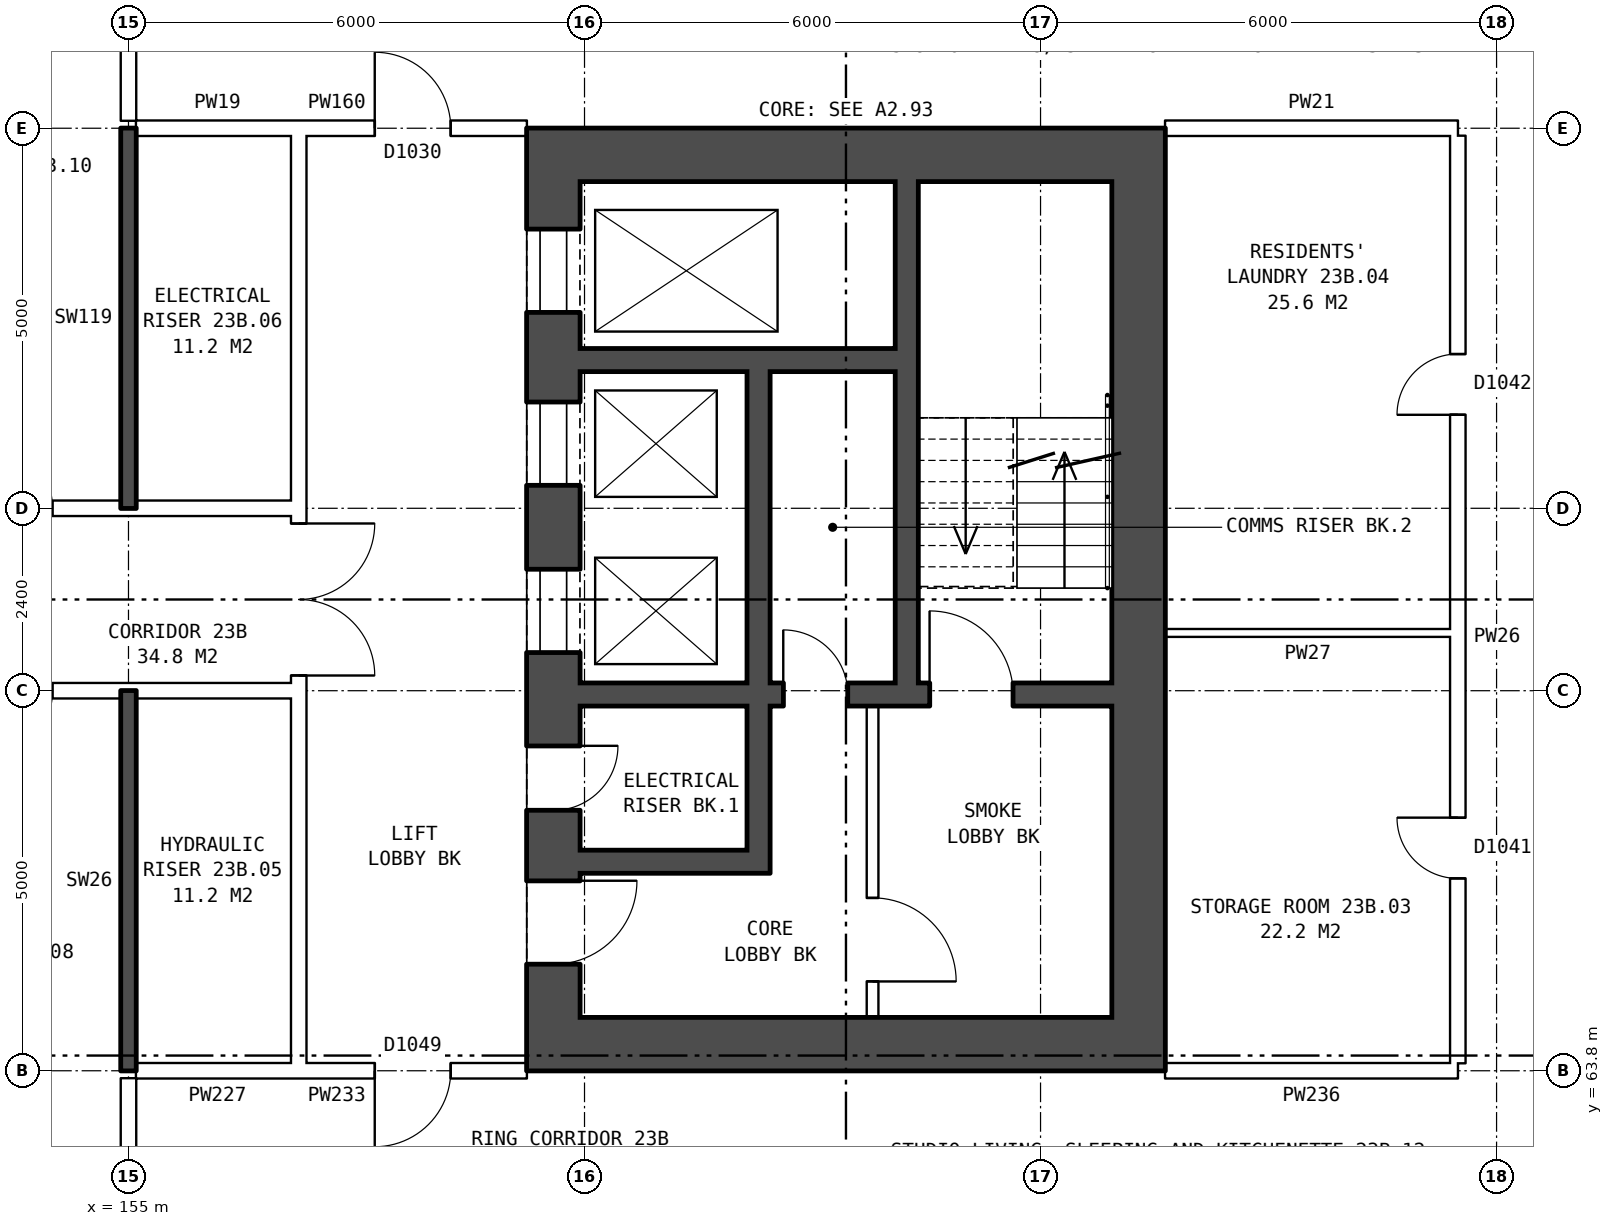
"""IFC4 building model, lengths in metres.
Left out: names, types, materials, properties, quantities, classifications, styles, units other than length and angle.
Written with IfcOpenShell. Run it as: python <this file> out.ifc"""

import sys

from ifc_helpers import new_model, si_unit, direction, frame, frame_2d, origin, place, context, subcontext, project, spatial, rectangle, extrude, element, fill, save


model = new_model("IFC4")
c1 = context("Model", 3, precision=1e-05, world=origin(), true_north=direction((0.0, 1.0)))
c2 = subcontext(c1, "Body", "Model", "MODEL_VIEW")
j1 = project(units=[si_unit("LENGTHUNIT", "METRE"), si_unit("PLANEANGLEUNIT", "RADIAN")], contexts=[c1])
p1 = place(None, origin())
s1 = spatial("IfcSite", under=j1, at=p1, CompositionType="ELEMENT")
p2 = place(p1, origin())
s2 = spatial("IfcBuilding", under=s1, at=p2, CompositionType="ELEMENT")
p3 = place(p2, frame((0.0, 0.0, 84.0)))
s3 = spatial("IfcBuildingStorey", under=s2, at=p3, CompositionType="ELEMENT", Elevation=84.0)
p4 = place(p3, frame((160.59, 75.5, 0.0), z_axis=(0.0, 0.0, 1.0), x_axis=(0.0, -1.0, 0.0)))
e1 = element("IfcWall", 1, at=p4, inside=s3, PredefinedType="SHEAR", context=c2, shape_type="SweptSolid", body=[
    extrude(rectangle(XDim=11.0, YDim=0.7, at=frame_2d((5.5, 0.0))), origin(), (0.0, 0.0, 1.0), 2.85),
])
p5 = place(p4, frame((0.625, 0.0, 0.0)))
e2 = element("IfcOpeningElement", 2, at=p5, cuts=e1, PredefinedType="OPENING", context=c2, shape_type="SweptSolid", body=[
    extrude(rectangle(XDim=1.1, YDim=2.1, at=frame_2d((0.55, 1.05))), frame((0.0, 0.36, 0.0), z_axis=(0.0, -1.0, 0.0), x_axis=(1.0, 0.0, 0.0)), (0.0, 0.0, 1.0), 0.72),
])
p6 = place(p4, frame((2.9, 0.0, 0.0)))
e3 = element("IfcOpeningElement", 3, at=p6, cuts=e1, PredefinedType="OPENING", context=c2, shape_type="SweptSolid", body=[
    extrude(rectangle(XDim=1.1, YDim=2.1, at=frame_2d((0.55, 1.05))), frame((0.0, 0.36, 0.0), z_axis=(0.0, -1.0, 0.0), x_axis=(1.0, 0.0, 0.0)), (0.0, 0.0, 1.0), 0.72),
])
p7 = place(p4, frame((5.1, 0.0, 0.0)))
e4 = element("IfcOpeningElement", 4, at=p7, cuts=e1, PredefinedType="OPENING", context=c2, shape_type="SweptSolid", body=[
    extrude(rectangle(XDim=1.1, YDim=2.1, at=frame_2d((0.55, 1.05))), frame((0.0, 0.36, 0.0), z_axis=(0.0, -1.0, 0.0), x_axis=(1.0, 0.0, 0.0)), (0.0, 0.0, 1.0), 0.72),
])
p8 = place(p4, frame((9.2, 0.0, 0.0)))
e5 = element("IfcOpeningElement", 5, at=p8, cuts=e1, PredefinedType="OPENING", context=c2, shape_type="SweptSolid", body=[
    extrude(rectangle(XDim=1.1, YDim=2.1, at=frame_2d((0.55, 1.05))), frame((0.0, 0.36, 0.0), z_axis=(0.0, -1.0, 0.0), x_axis=(1.0, 0.0, 0.0)), (0.0, 0.0, 1.0), 0.72),
])
p9 = place(p4, frame((7.425, 0.0, 0.0)))
e6 = element("IfcOpeningElement", 6, at=p9, cuts=e1, PredefinedType="OPENING", context=c2, shape_type="SweptSolid", body=[
    extrude(rectangle(XDim=0.85, YDim=2.1, at=frame_2d((0.425, 1.05))), frame((0.0, 0.36, 0.0), z_axis=(0.0, -1.0, 0.0), x_axis=(1.0, 0.0, 0.0)), (0.0, 0.0, 1.0), 0.72),
])
p10 = place(p3, frame((168.29, 75.5, 0.0), z_axis=(0.0, 0.0, 1.0), x_axis=(0.0, -1.0, 0.0)))
e7 = element("IfcWall", 7, at=p10, inside=s3, PredefinedType="SHEAR", context=c2, shape_type="SweptSolid", body=[
    extrude(rectangle(XDim=11.0, YDim=0.7, at=frame_2d((5.5, 0.0))), origin(), (0.0, 0.0, 1.0), 2.85),
])
for number, where, z_axis, x_axis in (
    (8, (160.24, 75.85, 0.0), (0.0, 0.0, 1.0), (1.0, 0.0, 0.0)),
    (9, (160.24, 64.15, 0.0), (0.0, 0.0, 1.0), (1.0, 0.0, 0.0)),
):
    element("IfcWall", number, at=place(p3, frame(where, z_axis=z_axis, x_axis=x_axis)), inside=s3, PredefinedType="SHEAR", context=c2, shape_type="SweptSolid", body=[
        extrude(rectangle(XDim=8.4, YDim=0.7, at=frame_2d((4.2, 0.0))), origin(), (0.0, 0.0, 1.0), 2.85),
    ])
p11 = place(p3, frame((160.94, 73.15, 0.0), z_axis=(0.0, 0.0, 1.0), x_axis=(1.0, 0.0, 0.0)))
e10 = element("IfcWall", 10, at=p11, inside=s3, PredefinedType="SHEAR", context=c2, shape_type="SweptSolid", body=[
    extrude(rectangle(XDim=4.15, YDim=0.3, at=frame_2d((2.075, 0.0))), origin(), (0.0, 0.0, 1.0), 2.85),
])
p12 = place(p3, frame((160.94, 68.75, 0.0), z_axis=(0.0, 0.0, 1.0), x_axis=(1.0, 0.0, 0.0)))
e11 = element("IfcWall", 11, at=p12, inside=s3, PredefinedType="SHEAR", context=c2, shape_type="SweptSolid", body=[
    extrude(rectangle(XDim=7.0, YDim=0.3, at=frame_2d((3.5, 0.0))), origin(), (0.0, 0.0, 1.0), 2.85),
])
p13 = place(p12, frame((4.6, 0.0, 0.0)))
e12 = element("IfcOpeningElement", 12, at=p13, cuts=e11, PredefinedType="OPENING", context=c2, shape_type="SweptSolid", body=[
    extrude(rectangle(XDim=1.1, YDim=2.1, at=frame_2d((0.55, 1.05))), frame((0.0, 0.16, 0.0), z_axis=(0.0, -1.0, 0.0), x_axis=(1.0, 0.0, 0.0)), (0.0, 0.0, 1.0), 0.32),
])
p14 = place(p12, frame((2.675, 0.0, 0.0)))
e13 = element("IfcOpeningElement", 13, at=p14, cuts=e11, PredefinedType="OPENING", context=c2, shape_type="SweptSolid", body=[
    extrude(rectangle(XDim=0.85, YDim=2.1, at=frame_2d((0.425, 1.05))), frame((0.0, 0.16, 0.0), z_axis=(0.0, -1.0, 0.0), x_axis=(1.0, 0.0, 0.0)), (0.0, 0.0, 1.0), 0.32),
])
p15 = place(p3, frame((160.94, 66.55, 0.0), z_axis=(0.0, 0.0, 1.0), x_axis=(1.0, 0.0, 0.0)))
e14 = element("IfcWall", 14, at=p15, inside=s3, PredefinedType="SHEAR", context=c2, shape_type="SweptSolid", body=[
    extrude(rectangle(XDim=2.2, YDim=0.3, at=frame_2d((1.1, 0.0))), origin(), (0.0, 0.0, 1.0), 2.85),
])
p16 = place(p3, frame((163.29, 73.0, 0.0), z_axis=(0.0, 0.0, 1.0), x_axis=(0.0, -1.0, 0.0)))
e15 = element("IfcWall", 15, at=p16, inside=s3, PredefinedType="SHEAR", context=c2, shape_type="SweptSolid", body=[
    extrude(rectangle(XDim=4.1, YDim=0.3, at=frame_2d((2.05, 0.0))), origin(), (0.0, 0.0, 1.0), 2.85),
])
p17 = place(p3, frame((163.29, 68.6, 0.0), z_axis=(0.0, 0.0, 1.0), x_axis=(0.0, -1.0, 0.0)))
e16 = element("IfcWall", 16, at=p17, inside=s3, PredefinedType="SHEAR", context=c2, shape_type="SweptSolid", body=[
    extrude(rectangle(XDim=2.2, YDim=0.3, at=frame_2d((1.1, 0.0))), origin(), (0.0, 0.0, 1.0), 2.85),
])
p18 = place(p3, frame((164.79, 68.6, 0.0), z_axis=(0.0, 0.0, 1.0), x_axis=(0.0, -1.0, 0.0)))
e17 = element("IfcWall", 17, at=p18, inside=s3, PredefinedType="PARTITIONING", context=c2, shape_type="SweptSolid", body=[
    extrude(rectangle(XDim=4.1, YDim=0.15, at=frame_2d((2.05, 0.0))), origin(), (0.0, 0.0, 1.0), 2.85),
])
p19 = place(p18, frame((2.525, 0.0, 0.0)))
e18 = element("IfcOpeningElement", 18, at=p19, cuts=e17, PredefinedType="OPENING", context=c2, shape_type="SweptSolid", body=[
    extrude(rectangle(XDim=1.1, YDim=2.1, at=frame_2d((0.55, 1.05))), frame((0.0, 0.085, 0.0), z_axis=(0.0, -1.0, 0.0), x_axis=(1.0, 0.0, 0.0)), (0.0, 0.0, 1.0), 0.17),
])
p20 = place(p3, frame((165.24, 75.5, 0.0), z_axis=(0.0, 0.0, 1.0), x_axis=(0.0, -1.0, 0.0)))
e19 = element("IfcWall", 19, at=p20, inside=s3, PredefinedType="SHEAR", context=c2, shape_type="SweptSolid", body=[
    extrude(rectangle(XDim=6.6, YDim=0.3, at=frame_2d((3.3, 0.0))), origin(), (0.0, 0.0, 1.0), 2.85),
])
p21 = place(p3, frame((157.24, 63.9, 0.0), z_axis=(0.0, 0.0, 1.0), x_axis=(0.0, 1.0, 0.0)))
e20 = element("IfcWall", 20, at=p21, inside=s3, PredefinedType="PARTITIONING", context=c2, shape_type="SweptSolid", body=[
    extrude(rectangle(XDim=12.2, YDim=0.2, at=frame_2d((6.1, 0.0))), origin(), (0.0, 0.0, 1.0), 2.85),
])
p22 = place(p21, frame((5.1, 0.0, 0.0)))
e21 = element("IfcOpeningElement", 21, at=p22, cuts=e20, PredefinedType="OPENING", context=c2, shape_type="SweptSolid", body=[
    extrude(rectangle(XDim=2.0, YDim=2.1, at=frame_2d((1.0, 1.05))), frame((0.0, 0.11, 0.0), z_axis=(0.0, -1.0, 0.0), x_axis=(1.0, 0.0, 0.0)), (0.0, 0.0, 1.0), 0.22),
])
p23 = place(p3, frame((155.1, 63.8, 0.0), z_axis=(0.0, 0.0, 1.0), x_axis=(1.0, 0.0, 0.0)))
e22 = element("IfcWall", 22, at=p23, inside=s3, PredefinedType="PARTITIONING", context=c2, shape_type="SweptSolid", body=[
    extrude(rectangle(XDim=2.14, YDim=0.2, at=frame_2d((1.07, 0.0))), origin(), (0.0, 0.0, 1.0), 2.85),
])
p24 = place(p3, frame((157.24, 63.8, 0.0), z_axis=(0.0, 0.0, 1.0), x_axis=(1.0, 0.0, 0.0)))
e23 = element("IfcWall", 23, at=p24, inside=s3, PredefinedType="PARTITIONING", context=c2, shape_type="SweptSolid", body=[
    extrude(rectangle(XDim=3.0, YDim=0.2, at=frame_2d((1.5, 0.0))), origin(), (0.0, 0.0, 1.0), 2.85),
])
p25 = place(p24, frame((1.0, 0.0, 0.0)))
e24 = element("IfcOpeningElement", 24, at=p25, cuts=e23, PredefinedType="OPENING", context=c2, shape_type="SweptSolid", body=[
    extrude(rectangle(XDim=1.0, YDim=2.1, at=frame_2d((0.5, 1.05))), frame((0.0, 0.11, 0.0), z_axis=(0.0, -1.0, 0.0), x_axis=(1.0, 0.0, 0.0)), (0.0, 0.0, 1.0), 0.22),
])
p26 = place(p3, frame((168.64, 63.8, 0.0), z_axis=(0.0, 0.0, 1.0), x_axis=(1.0, 0.0, 0.0)))
e25 = element("IfcWall", 25, at=p26, inside=s3, PredefinedType="PARTITIONING", context=c2, shape_type="SweptSolid", body=[
    extrude(rectangle(XDim=3.85, YDim=0.2, at=frame_2d((1.925, 0.0))), origin(), (0.0, 0.0, 1.0), 2.85),
])
p27 = place(p3, frame((142.76, 68.8, 0.0), z_axis=(0.0, 0.0, 1.0), x_axis=(1.0, 0.0, 0.0)))
e26 = element("IfcWall", 26, at=p27, inside=s3, PredefinedType="PARTITIONING", context=c2, shape_type="SweptSolid", body=[
    extrude(rectangle(XDim=14.48, YDim=0.2, at=frame_2d((7.24, 0.0))), origin(), (0.0, 0.0, 1.0), 2.85),
])
p28 = place(p27, frame((4.24, 0.0, 0.0)))
e27 = element("IfcOpeningElement", 27, at=p28, cuts=e26, PredefinedType="OPENING", context=c2, shape_type="SweptSolid", body=[
    extrude(rectangle(XDim=1.0, YDim=2.1, at=frame_2d((0.5, 1.05))), frame((0.0, 0.11, 0.0), z_axis=(0.0, -1.0, 0.0), x_axis=(1.0, 0.0, 0.0)), (0.0, 0.0, 1.0), 0.22),
])
p29 = place(p27, frame((10.24, 0.0, 0.0)))
e28 = element("IfcOpeningElement", 28, at=p29, cuts=e26, PredefinedType="OPENING", context=c2, shape_type="SweptSolid", body=[
    extrude(rectangle(XDim=1.0, YDim=2.1, at=frame_2d((0.5, 1.05))), frame((0.0, 0.11, 0.0), z_axis=(0.0, -1.0, 0.0), x_axis=(1.0, 0.0, 0.0)), (0.0, 0.0, 1.0), 0.22),
])
p30 = place(p3, frame((168.64, 69.56, 0.0), z_axis=(0.0, 0.0, 1.0), x_axis=(1.0, 0.0, 0.0)))
e29 = element("IfcWall", 29, at=p30, inside=s3, PredefinedType="PARTITIONING", context=c2, shape_type="SweptSolid", body=[
    extrude(rectangle(XDim=3.75, YDim=0.1, at=frame_2d((1.875, 0.0))), origin(), (0.0, 0.0, 1.0), 2.85),
])
p31 = place(p3, frame((142.76, 71.2, 0.0), z_axis=(0.0, 0.0, 1.0), x_axis=(1.0, 0.0, 0.0)))
e30 = element("IfcWall", 30, at=p31, inside=s3, PredefinedType="PARTITIONING", context=c2, shape_type="SweptSolid", body=[
    extrude(rectangle(XDim=14.48, YDim=0.2, at=frame_2d((7.24, 0.0))), origin(), (0.0, 0.0, 1.0), 2.85),
])
p32 = place(p31, frame((1.12, 0.0, 0.0)))
e31 = element("IfcOpeningElement", 31, at=p32, cuts=e30, PredefinedType="OPENING", context=c2, shape_type="SweptSolid", body=[
    extrude(rectangle(XDim=1.0, YDim=2.1, at=frame_2d((0.5, 1.05))), frame((0.0, 0.11, 0.0), z_axis=(0.0, -1.0, 0.0), x_axis=(1.0, 0.0, 0.0)), (0.0, 0.0, 1.0), 0.22),
])
p33 = place(p31, frame((10.24, 0.0, 0.0)))
e32 = element("IfcOpeningElement", 32, at=p33, cuts=e30, PredefinedType="OPENING", context=c2, shape_type="SweptSolid", body=[
    extrude(rectangle(XDim=1.0, YDim=2.1, at=frame_2d((0.5, 1.05))), frame((0.0, 0.11, 0.0), z_axis=(0.0, -1.0, 0.0), x_axis=(1.0, 0.0, 0.0)), (0.0, 0.0, 1.0), 0.22),
])
p34 = place(p3, frame((155.1, 76.2, 0.0), z_axis=(0.0, 0.0, 1.0), x_axis=(1.0, 0.0, 0.0)))
e33 = element("IfcWall", 33, at=p34, inside=s3, PredefinedType="PARTITIONING", context=c2, shape_type="SweptSolid", body=[
    extrude(rectangle(XDim=2.14, YDim=0.2, at=frame_2d((1.07, 0.0))), origin(), (0.0, 0.0, 1.0), 2.85),
])
p35 = place(p3, frame((157.24, 76.2, 0.0), z_axis=(0.0, 0.0, 1.0), x_axis=(1.0, 0.0, 0.0)))
e34 = element("IfcWall", 34, at=p35, inside=s3, PredefinedType="PARTITIONING", context=c2, shape_type="SweptSolid", body=[
    extrude(rectangle(XDim=3.0, YDim=0.2, at=frame_2d((1.5, 0.0))), origin(), (0.0, 0.0, 1.0), 2.85),
])
p36 = place(p35, frame((1.0, 0.0, 0.0)))
e35 = element("IfcOpeningElement", 35, at=p36, cuts=e34, PredefinedType="OPENING", context=c2, shape_type="SweptSolid", body=[
    extrude(rectangle(XDim=1.0, YDim=2.1, at=frame_2d((0.5, 1.05))), frame((0.0, 0.11, 0.0), z_axis=(0.0, -1.0, 0.0), x_axis=(1.0, 0.0, 0.0)), (0.0, 0.0, 1.0), 0.22),
])
p37 = place(p3, frame((168.64, 76.2, 0.0), z_axis=(0.0, 0.0, 1.0), x_axis=(1.0, 0.0, 0.0)))
e36 = element("IfcWall", 36, at=p37, inside=s3, PredefinedType="PARTITIONING", context=c2, shape_type="SweptSolid", body=[
    extrude(rectangle(XDim=3.85, YDim=0.2, at=frame_2d((1.925, 0.0))), origin(), (0.0, 0.0, 1.0), 2.85),
])
p38 = place(p3, frame((155.0, 61.5, 0.0), z_axis=(0.0, 0.0, 1.0), x_axis=(0.0, 1.0, 0.0)))
e37 = element("IfcWall", 37, at=p38, inside=s3, PredefinedType="PARTITIONING", context=c2, shape_type="SweptSolid", body=[
    extrude(rectangle(XDim=2.2, YDim=0.2, at=frame_2d((1.1, 0.0))), origin(), (0.0, 0.0, 1.0), 2.85),
])
for number, where, z_axis, x_axis in (
    (38, (155.0, 63.8, 0.0), (0.0, 0.0, 1.0), (0.0, 1.0, 0.0)),
    (39, (155.0, 71.2, 0.0), (0.0, 0.0, 1.0), (0.0, 1.0, 0.0)),
):
    element("IfcWall", number, at=place(p3, frame(where, z_axis=z_axis, x_axis=x_axis)), inside=s3, PredefinedType="SOLIDWALL", context=c2, shape_type="SweptSolid", body=[
        extrude(rectangle(XDim=5.0, YDim=0.2, at=frame_2d((2.5, 0.0))), origin(), (0.0, 0.0, 1.0), 2.85),
    ])
p39 = place(p3, frame((155.0, 76.3, 0.0), z_axis=(0.0, 0.0, 1.0), x_axis=(0.0, 1.0, 0.0)))
e40 = element("IfcWall", 40, at=p39, inside=s3, PredefinedType="PARTITIONING", context=c2, shape_type="SweptSolid", body=[
    extrude(rectangle(XDim=2.2, YDim=0.2, at=frame_2d((1.1, 0.0))), origin(), (0.0, 0.0, 1.0), 2.85),
])
p40 = place(p3, frame((172.49, 63.9, 0.0), z_axis=(0.0, 0.0, 1.0), x_axis=(0.0, 1.0, 0.0)))
e41 = element("IfcWall", 41, at=p40, inside=s3, PredefinedType="PARTITIONING", context=c2, shape_type="SweptSolid", body=[
    extrude(rectangle(XDim=12.2, YDim=0.2, at=frame_2d((6.1, 0.0))), origin(), (0.0, 0.0, 1.0), 2.85),
])
p41 = place(p40, frame((2.43, 0.0, 0.0)))
e42 = element("IfcOpeningElement", 42, at=p41, cuts=e41, PredefinedType="OPENING", context=c2, shape_type="SweptSolid", body=[
    extrude(rectangle(XDim=0.8, YDim=2.1, at=frame_2d((0.4, 1.05))), frame((0.0, 0.11, 0.0), z_axis=(0.0, -1.0, 0.0), x_axis=(1.0, 0.0, 0.0)), (0.0, 0.0, 1.0), 0.22),
])
p42 = place(p40, frame((8.53, 0.0, 0.0)))
e43 = element("IfcOpeningElement", 43, at=p42, cuts=e41, PredefinedType="OPENING", context=c2, shape_type="SweptSolid", body=[
    extrude(rectangle(XDim=0.8, YDim=2.1, at=frame_2d((0.4, 1.05))), frame((0.0, 0.11, 0.0), z_axis=(0.0, -1.0, 0.0), x_axis=(1.0, 0.0, 0.0)), (0.0, 0.0, 1.0), 0.22),
])
p43 = place(p5, origin())
e44 = element("IfcDoor", 44, at=p43, inside=s3, OperationType="DOUBLE_DOOR_SLIDING", PredefinedType="DOOR", context=c2, shape_type="SweptSolid", body=[
    extrude(rectangle(XDim=1.1, YDim=2.1, at=frame_2d((0.55, 1.05))), frame((0.0, 0.335, 0.0), z_axis=(0.0, -1.0, 0.0), x_axis=(1.0, 0.0, 0.0)), (0.0, 0.0, 1.0), 0.05),
])
fill(e2, e44)
p44 = place(p6, origin())
e45 = element("IfcDoor", 45, at=p44, inside=s3, OperationType="DOUBLE_DOOR_SLIDING", PredefinedType="DOOR", context=c2, shape_type="SweptSolid", body=[
    extrude(rectangle(XDim=1.1, YDim=2.1, at=frame_2d((0.55, 1.05))), frame((0.0, 0.335, 0.0), z_axis=(0.0, -1.0, 0.0), x_axis=(1.0, 0.0, 0.0)), (0.0, 0.0, 1.0), 0.05),
])
fill(e3, e45)
p45 = place(p7, origin())
e46 = element("IfcDoor", 46, at=p45, inside=s3, OperationType="DOUBLE_DOOR_SLIDING", PredefinedType="DOOR", context=c2, shape_type="SweptSolid", body=[
    extrude(rectangle(XDim=1.1, YDim=2.1, at=frame_2d((0.55, 1.05))), frame((0.0, 0.335, 0.0), z_axis=(0.0, -1.0, 0.0), x_axis=(1.0, 0.0, 0.0)), (0.0, 0.0, 1.0), 0.05),
])
fill(e4, e46)
p46 = place(p8, origin())
e47 = element("IfcDoor", 47, at=p46, inside=s3, OperationType="SINGLE_SWING_LEFT", PredefinedType="DOOR", context=c2, shape_type="SweptSolid", body=[
    extrude(rectangle(XDim=1.1, YDim=2.1, at=frame_2d((0.55, 1.05))), frame((0.0, 0.335, 0.0), z_axis=(0.0, -1.0, 0.0), x_axis=(1.0, 0.0, 0.0)), (0.0, 0.0, 1.0), 0.05),
])
fill(e5, e47)
p47 = place(p19, origin())
e48 = element("IfcDoor", 48, at=p47, inside=s3, OperationType="SINGLE_SWING_RIGHT", PredefinedType="DOOR", context=c2, shape_type="SweptSolid", body=[
    extrude(rectangle(XDim=1.1, YDim=2.1, at=frame_2d((0.55, 1.05))), frame((0.0, 0.025, 0.0), z_axis=(0.0, -1.0, 0.0), x_axis=(1.0, 0.0, 0.0)), (0.0, 0.0, 1.0), 0.05),
])
fill(e18, e48)
p48 = place(p13, origin())
e49 = element("IfcDoor", 49, at=p48, inside=s3, OperationType="SINGLE_SWING_LEFT", PredefinedType="DOOR", context=c2, shape_type="SweptSolid", body=[
    extrude(rectangle(XDim=1.1, YDim=2.1, at=frame_2d((0.55, 1.05))), frame((0.0, 0.025, 0.0), z_axis=(0.0, -1.0, 0.0), x_axis=(1.0, 0.0, 0.0)), (0.0, 0.0, 1.0), 0.05),
])
fill(e12, e49)
p49 = place(p9, origin())
e50 = element("IfcDoor", 50, at=p49, inside=s3, OperationType="SINGLE_SWING_LEFT", PredefinedType="DOOR", context=c2, shape_type="SweptSolid", body=[
    extrude(rectangle(XDim=0.85, YDim=2.1, at=frame_2d((0.425, 1.05))), frame((0.0, 0.335, 0.0), z_axis=(0.0, -1.0, 0.0), x_axis=(1.0, 0.0, 0.0)), (0.0, 0.0, 1.0), 0.05),
])
fill(e6, e50)
p50 = place(p14, origin())
e51 = element("IfcDoor", 51, at=p50, inside=s3, OperationType="SINGLE_SWING_LEFT", PredefinedType="DOOR", context=c2, shape_type="SweptSolid", body=[
    extrude(rectangle(XDim=0.85, YDim=2.1, at=frame_2d((0.425, 1.05))), frame((0.0, 0.025, 0.0), z_axis=(0.0, -1.0, 0.0), x_axis=(1.0, 0.0, 0.0)), (0.0, 0.0, 1.0), 0.05),
])
fill(e13, e51)
p51 = place(p22, frame((2.0, 0.0, 0.0), z_axis=(0.0, 0.0, 1.0), x_axis=(-1.0, 0.0, 0.0)))
e52 = element("IfcDoor", 52, at=p51, inside=s3, OperationType="DOUBLE_DOOR_SINGLE_SWING", PredefinedType="DOOR", context=c2, shape_type="SweptSolid", body=[
    extrude(rectangle(XDim=2.0, YDim=2.1, at=frame_2d((1.0, 1.05))), frame((0.0, 0.025, 0.0), z_axis=(0.0, -1.0, 0.0), x_axis=(1.0, 0.0, 0.0)), (0.0, 0.0, 1.0), 0.05),
])
fill(e21, e52)
p52 = place(p25, frame((1.0, 0.0, 0.0), z_axis=(0.0, 0.0, 1.0), x_axis=(-1.0, 0.0, 0.0)))
e53 = element("IfcDoor", 53, at=p52, inside=s3, OperationType="SINGLE_SWING_RIGHT", PredefinedType="DOOR", context=c2, shape_type="SweptSolid", body=[
    extrude(rectangle(XDim=1.0, YDim=2.1, at=frame_2d((0.5, 1.05))), frame((0.0, 0.025, 0.0), z_axis=(0.0, -1.0, 0.0), x_axis=(1.0, 0.0, 0.0)), (0.0, 0.0, 1.0), 0.05),
])
fill(e24, e53)
p53 = place(p36, origin())
e54 = element("IfcDoor", 54, at=p53, inside=s3, OperationType="SINGLE_SWING_LEFT", PredefinedType="DOOR", context=c2, shape_type="SweptSolid", body=[
    extrude(rectangle(XDim=1.0, YDim=2.1, at=frame_2d((0.5, 1.05))), frame((0.0, 0.025, 0.0), z_axis=(0.0, -1.0, 0.0), x_axis=(1.0, 0.0, 0.0)), (0.0, 0.0, 1.0), 0.05),
])
fill(e35, e54)
p54 = place(p41, origin())
e55 = element("IfcDoor", 55, at=p54, inside=s3, OperationType="SINGLE_SWING_RIGHT", PredefinedType="DOOR", context=c2, shape_type="SweptSolid", body=[
    extrude(rectangle(XDim=0.8, YDim=2.1, at=frame_2d((0.4, 1.05))), frame((0.0, 0.025, 0.0), z_axis=(0.0, -1.0, 0.0), x_axis=(1.0, 0.0, 0.0)), (0.0, 0.0, 1.0), 0.05),
])
fill(e42, e55)
p55 = place(p42, origin())
e56 = element("IfcDoor", 56, at=p55, inside=s3, OperationType="SINGLE_SWING_LEFT", PredefinedType="DOOR", context=c2, shape_type="SweptSolid", body=[
    extrude(rectangle(XDim=0.8, YDim=2.1, at=frame_2d((0.4, 1.05))), frame((0.0, 0.025, 0.0), z_axis=(0.0, -1.0, 0.0), x_axis=(1.0, 0.0, 0.0)), (0.0, 0.0, 1.0), 0.05),
])
fill(e43, e56)
save(model, sys.argv[1])
